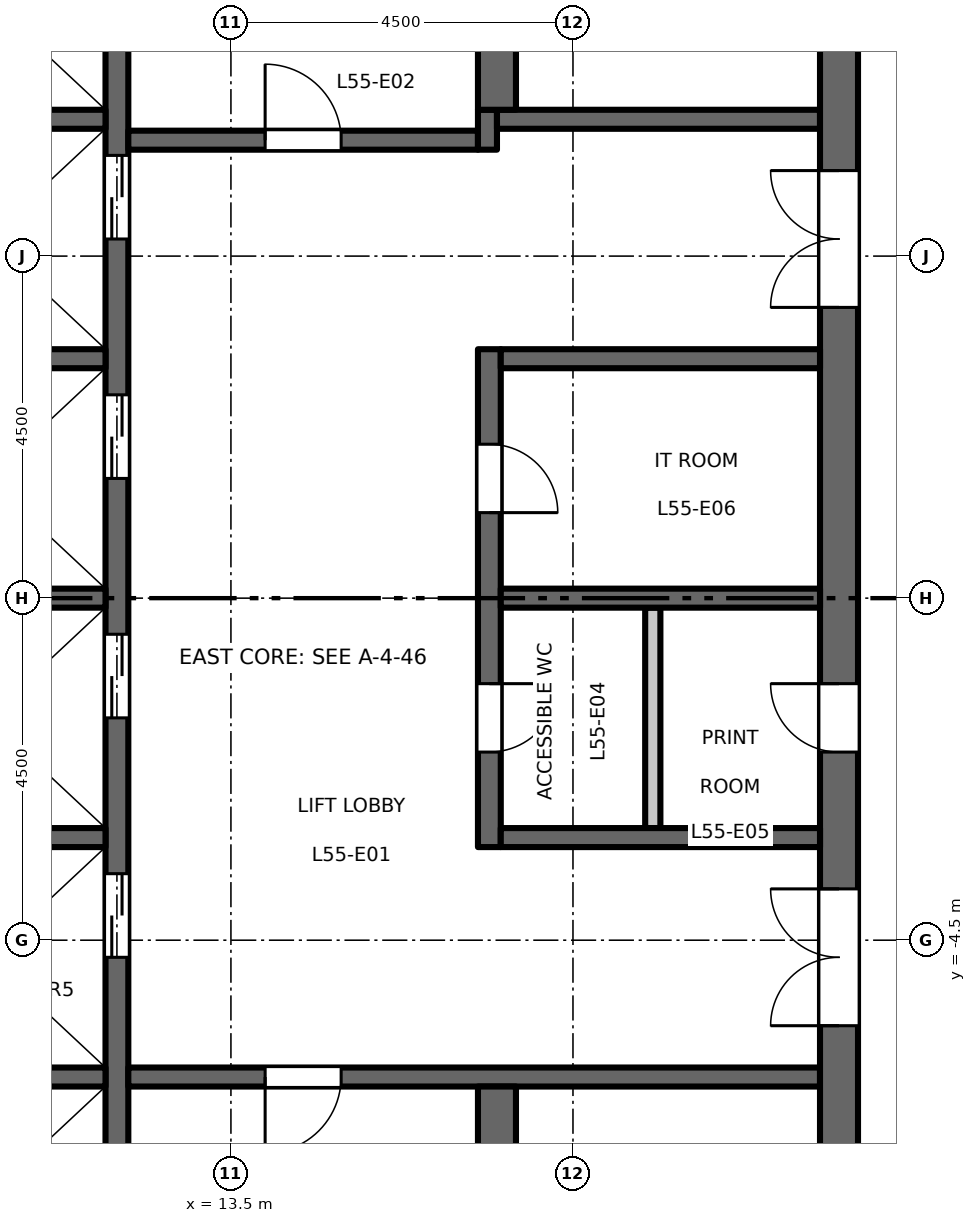
"""IFC4 building model, lengths in metres.
Left out: names, types, materials, properties, quantities, classifications, styles, units other than length and angle.
Written with IfcOpenShell. Run it as: python <this file> out.ifc"""

import sys

from ifc_helpers import new_model, si_unit, direction, frame, frame_2d, origin, place, context, subcontext, project, spatial, rectangle, extrude, element, fill, save


model = new_model("IFC4")
c1 = context("Model", 3, precision=1e-05, world=origin(), true_north=direction((0.0, 1.0)))
c2 = subcontext(c1, "Body", "Model", "MODEL_VIEW")
j1 = project(units=[si_unit("LENGTHUNIT", "METRE"), si_unit("PLANEANGLEUNIT", "RADIAN")], contexts=[c1])
p1 = place(None, origin())
s1 = spatial("IfcSite", under=j1, at=p1, CompositionType="ELEMENT")
p2 = place(p1, origin())
s2 = spatial("IfcBuilding", under=s1, at=p2, CompositionType="ELEMENT")
p3 = place(p2, frame((0.0, 0.0, 255.7)))
s3 = spatial("IfcBuildingStorey", under=s2, at=p3, CompositionType="ELEMENT", Elevation=255.7)
p4 = place(p3, frame((12.0, -9.45, 0.0), z_axis=(0.0, 0.0, 1.0), x_axis=(0.0, 1.0, 0.0)))
e1 = element("IfcWall", 1, at=p4, inside=s3, PredefinedType="SHEAR", context=c2, shape_type="SweptSolid", body=[
    extrude(rectangle(XDim=18.9, YDim=0.3, at=frame_2d((9.45, 0.0))), origin(), (0.0, 0.0, 1.0), 4.35),
])
p5 = place(p4, frame((4.725, 0.0, 0.0)))
e2 = element("IfcOpeningElement", 2, at=p5, cuts=e1, PredefinedType="OPENING", context=c2, shape_type="SweptSolid", body=[
    extrude(rectangle(XDim=1.1, YDim=2.1, at=frame_2d((0.55, 1.05))), frame((0.0, 0.16, 0.0), z_axis=(0.0, -1.0, 0.0), x_axis=(1.0, 0.0, 0.0)), (0.0, 0.0, 1.0), 0.32),
])
p6 = place(p4, frame((7.875, 0.0, 0.0)))
e3 = element("IfcOpeningElement", 3, at=p6, cuts=e1, PredefinedType="OPENING", context=c2, shape_type="SweptSolid", body=[
    extrude(rectangle(XDim=1.1, YDim=2.1, at=frame_2d((0.55, 1.05))), frame((0.0, 0.16, 0.0), z_axis=(0.0, -1.0, 0.0), x_axis=(1.0, 0.0, 0.0)), (0.0, 0.0, 1.0), 0.32),
])
p7 = place(p4, frame((11.025, 0.0, 0.0)))
e4 = element("IfcOpeningElement", 4, at=p7, cuts=e1, PredefinedType="OPENING", context=c2, shape_type="SweptSolid", body=[
    extrude(rectangle(XDim=1.1, YDim=2.1, at=frame_2d((0.55, 1.05))), frame((0.0, 0.16, 0.0), z_axis=(0.0, -1.0, 0.0), x_axis=(1.0, 0.0, 0.0)), (0.0, 0.0, 1.0), 0.32),
])
p8 = place(p4, frame((14.175, 0.0, 0.0)))
e5 = element("IfcOpeningElement", 5, at=p8, cuts=e1, PredefinedType="OPENING", context=c2, shape_type="SweptSolid", body=[
    extrude(rectangle(XDim=1.1, YDim=2.1, at=frame_2d((0.55, 1.05))), frame((0.0, 0.16, 0.0), z_axis=(0.0, -1.0, 0.0), x_axis=(1.0, 0.0, 0.0)), (0.0, 0.0, 1.0), 0.32),
])
p9 = place(p4, frame((16.725, 0.0, 0.0)))
e6 = element("IfcOpeningElement", 6, at=p9, cuts=e1, PredefinedType="OPENING", context=c2, shape_type="SweptSolid", body=[
    extrude(rectangle(XDim=1.2, YDim=2.1, at=frame_2d((0.6, 1.05))), frame((0.0, 0.16, 0.0), z_axis=(0.0, -1.0, 0.0), x_axis=(1.0, 0.0, 0.0)), (0.0, 0.0, 1.0), 0.32),
])
p10 = place(p4, frame((0.975, 0.0, 0.0)))
e7 = element("IfcOpeningElement", 7, at=p10, cuts=e1, PredefinedType="OPENING", context=c2, shape_type="SweptSolid", body=[
    extrude(rectangle(XDim=1.2, YDim=2.1, at=frame_2d((0.6, 1.05))), frame((0.0, 0.16, 0.0), z_axis=(0.0, -1.0, 0.0), x_axis=(1.0, 0.0, 0.0)), (0.0, 0.0, 1.0), 0.32),
])
p11 = place(p3, frame((12.15, 6.025, 0.0), z_axis=(0.0, 0.0, 1.0), x_axis=(1.0, 0.0, 0.0)))
e8 = element("IfcWall", 8, at=p11, inside=s3, PredefinedType="SHEAR", context=c2, shape_type="SweptSolid", body=[
    extrude(rectangle(XDim=4.6, YDim=0.25, at=frame_2d((2.3, 0.0))), origin(), (0.0, 0.0, 1.0), 4.35),
])
p12 = place(p11, frame((1.8, 0.0, 0.0)))
e9 = element("IfcOpeningElement", 9, at=p12, cuts=e8, PredefinedType="OPENING", context=c2, shape_type="SweptSolid", body=[
    extrude(rectangle(XDim=1.0, YDim=2.1, at=frame_2d((0.5, 1.05))), frame((0.0, 0.135, 0.0), z_axis=(0.0, -1.0, 0.0), x_axis=(1.0, 0.0, 0.0)), (0.0, 0.0, 1.0), 0.27),
])
p13 = place(p3, frame((16.875, 5.9, 0.0), z_axis=(0.0, 0.0, 1.0), x_axis=(0.0, 1.0, 0.0)))
e10 = element("IfcWall", 10, at=p13, inside=s3, PredefinedType="SHEAR", context=c2, shape_type="SweptSolid", body=[
    extrude(rectangle(XDim=0.525, YDim=0.25, at=frame_2d((0.263, 0.0))), origin(), (0.0, 0.0, 1.0), 4.35),
])
p14 = place(p3, frame((17.0, 6.3, 0.0), z_axis=(0.0, 0.0, 1.0), x_axis=(1.0, 0.0, 0.0)))
e11 = element("IfcWall", 11, at=p14, inside=s3, PredefinedType="SHEAR", context=c2, shape_type="SweptSolid", body=[
    extrude(rectangle(XDim=4.25, YDim=0.25, at=frame_2d((2.125, 0.0))), origin(), (0.0, 0.0, 1.0), 4.35),
])
p15 = place(p3, frame((12.15, -6.3, 0.0), z_axis=(0.0, 0.0, 1.0), x_axis=(1.0, 0.0, 0.0)))
e12 = element("IfcWall", 12, at=p15, inside=s3, PredefinedType="SHEAR", context=c2, shape_type="SweptSolid", body=[
    extrude(rectangle(XDim=9.1, YDim=0.25, at=frame_2d((4.55, 0.0))), origin(), (0.0, 0.0, 1.0), 4.35),
])
p16 = place(p15, frame((1.8, 0.0, 0.0)))
e13 = element("IfcOpeningElement", 13, at=p16, cuts=e12, PredefinedType="OPENING", context=c2, shape_type="SweptSolid", body=[
    extrude(rectangle(XDim=1.0, YDim=2.1, at=frame_2d((0.5, 1.05))), frame((0.0, 0.135, 0.0), z_axis=(0.0, -1.0, 0.0), x_axis=(1.0, 0.0, 0.0)), (0.0, 0.0, 1.0), 0.27),
])
p17 = place(p3, frame((21.5, -13.0, 0.0), z_axis=(0.0, 0.0, 1.0), x_axis=(0.0, 1.0, 0.0)))
e14 = element("IfcWall", 14, at=p17, inside=s3, PredefinedType="SHEAR", context=c2, shape_type="SweptSolid", body=[
    extrude(rectangle(XDim=26.0, YDim=0.5, at=frame_2d((13.0, 0.0))), origin(), (0.0, 0.0, 1.0), 4.35),
])
p18 = place(p17, frame((16.825, 0.0, 0.0)))
e15 = element("IfcOpeningElement", 15, at=p18, cuts=e14, PredefinedType="OPENING", context=c2, shape_type="SweptSolid", body=[
    extrude(rectangle(XDim=1.8, YDim=2.1, at=frame_2d((0.9, 1.05))), frame((0.0, 0.26, 0.0), z_axis=(0.0, -1.0, 0.0), x_axis=(1.0, 0.0, 0.0)), (0.0, 0.0, 1.0), 0.52),
])
p19 = place(p17, frame((7.375, 0.0, 0.0)))
e16 = element("IfcOpeningElement", 16, at=p19, cuts=e14, PredefinedType="OPENING", context=c2, shape_type="SweptSolid", body=[
    extrude(rectangle(XDim=1.8, YDim=2.1, at=frame_2d((0.9, 1.05))), frame((0.0, 0.26, 0.0), z_axis=(0.0, -1.0, 0.0), x_axis=(1.0, 0.0, 0.0)), (0.0, 0.0, 1.0), 0.52),
])
p20 = place(p17, frame((10.975, 0.0, 0.0)))
e17 = element("IfcOpeningElement", 17, at=p20, cuts=e14, PredefinedType="OPENING", context=c2, shape_type="SweptSolid", body=[
    extrude(rectangle(XDim=0.9, YDim=2.1, at=frame_2d((0.45, 1.05))), frame((0.0, 0.26, 0.0), z_axis=(0.0, -1.0, 0.0), x_axis=(1.0, 0.0, 0.0)), (0.0, 0.0, 1.0), 0.52),
])
p21 = place(p3, frame((16.9, -3.275, 0.0), z_axis=(0.0, 0.0, 1.0), x_axis=(0.0, 1.0, 0.0)))
e18 = element("IfcWall", 18, at=p21, inside=s3, PredefinedType="SHEAR", context=c2, shape_type="SweptSolid", body=[
    extrude(rectangle(XDim=6.55, YDim=0.3, at=frame_2d((3.275, 0.0))), origin(), (0.0, 0.0, 1.0), 4.35),
])
p22 = place(p21, frame((1.25, 0.0, 0.0)))
e19 = element("IfcOpeningElement", 19, at=p22, cuts=e18, PredefinedType="OPENING", context=c2, shape_type="SweptSolid", body=[
    extrude(rectangle(XDim=0.9, YDim=2.1, at=frame_2d((0.45, 1.05))), frame((0.0, 0.16, 0.0), z_axis=(0.0, -1.0, 0.0), x_axis=(1.0, 0.0, 0.0)), (0.0, 0.0, 1.0), 0.32),
])
p23 = place(p21, frame((4.4, 0.0, 0.0)))
e20 = element("IfcOpeningElement", 20, at=p23, cuts=e18, PredefinedType="OPENING", context=c2, shape_type="SweptSolid", body=[
    extrude(rectangle(XDim=0.9, YDim=2.1, at=frame_2d((0.45, 1.05))), frame((0.0, 0.16, 0.0), z_axis=(0.0, -1.0, 0.0), x_axis=(1.0, 0.0, 0.0)), (0.0, 0.0, 1.0), 0.32),
])
for number, where, z_axis, x_axis in (
    (21, (17.05, 0.0, 0.0), (0.0, 0.0, 1.0), (1.0, 0.0, 0.0)),
    (22, (17.05, 3.15, 0.0), (0.0, 0.0, 1.0), (1.0, 0.0, 0.0)),
    (23, (17.05, -3.15, 0.0), (0.0, 0.0, 1.0), (1.0, 0.0, 0.0)),
):
    element("IfcWall", number, at=place(p3, frame(where, z_axis=z_axis, x_axis=x_axis)), inside=s3, PredefinedType="SHEAR", context=c2, shape_type="SweptSolid", body=[
        extrude(rectangle(XDim=4.2, YDim=0.25, at=frame_2d((2.1, 0.0))), origin(), (0.0, 0.0, 1.0), 4.35),
    ])
p24 = place(p3, frame((19.05, -3.025, 0.0), z_axis=(0.0, 0.0, 1.0), x_axis=(0.0, 1.0, 0.0)))
e24 = element("IfcWall", 24, at=p24, inside=s3, PredefinedType="PARTITIONING", context=c2, shape_type="SweptSolid", body=[
    extrude(rectangle(XDim=2.9, YDim=0.2, at=frame_2d((1.45, 0.0))), origin(), (0.0, 0.0, 1.0), 4.35),
])
for number, where, z_axis, x_axis in (
    (25, (17.0, 6.425, 0.0), (0.0, 0.0, 1.0), (0.0, 1.0, 0.0)),
    (26, (17.0, -13.0, 0.0), (0.0, 0.0, 1.0), (0.0, 1.0, 0.0)),
):
    element("IfcWall", number, at=place(p3, frame(where, z_axis=z_axis, x_axis=x_axis)), inside=s3, PredefinedType="SHEAR", context=c2, shape_type="SweptSolid", body=[
        extrude(rectangle(XDim=6.575, YDim=0.5, at=frame_2d((3.288, 0.0))), origin(), (0.0, 0.0, 1.0), 4.35),
    ])
for number, where, z_axis, x_axis in (
    (27, (8.75, 0.0, 0.0), (0.0, 0.0, 1.0), (1.0, 0.0, 0.0)),
    (28, (8.75, 3.15, 0.0), (0.0, 0.0, 1.0), (1.0, 0.0, 0.0)),
    (29, (8.75, 6.3, 0.0), (0.0, 0.0, 1.0), (1.0, 0.0, 0.0)),
    (30, (8.75, -3.15, 0.0), (0.0, 0.0, 1.0), (1.0, 0.0, 0.0)),
    (31, (8.75, -6.3, 0.0), (0.0, 0.0, 1.0), (1.0, 0.0, 0.0)),
):
    element("IfcWall", number, at=place(p3, frame(where, z_axis=z_axis, x_axis=x_axis)), inside=s3, PredefinedType="SHEAR", context=c2, shape_type="SweptSolid", body=[
        extrude(rectangle(XDim=3.1, YDim=0.25, at=frame_2d((1.55, 0.0))), origin(), (0.0, 0.0, 1.0), 4.35),
    ])
p25 = place(p12, origin())
e32 = element("IfcDoor", 32, at=p25, inside=s3, OperationType="SINGLE_SWING_RIGHT", PredefinedType="DOOR", context=c2, shape_type="SweptSolid", body=[
    extrude(rectangle(XDim=1.0, YDim=2.1, at=frame_2d((0.5, 1.05))), frame((0.0, 0.025, 0.0), z_axis=(0.0, -1.0, 0.0), x_axis=(1.0, 0.0, 0.0)), (0.0, 0.0, 1.0), 0.05),
])
fill(e9, e32)
p26 = place(p16, origin())
e33 = element("IfcDoor", 33, at=p26, inside=s3, OperationType="SINGLE_SWING_LEFT", PredefinedType="DOOR", context=c2, shape_type="SweptSolid", body=[
    extrude(rectangle(XDim=1.0, YDim=2.1, at=frame_2d((0.5, 1.05))), frame((0.0, 0.025, 0.0), z_axis=(0.0, -1.0, 0.0), x_axis=(1.0, 0.0, 0.0)), (0.0, 0.0, 1.0), 0.05),
])
fill(e13, e33)
p27 = place(p18, origin())
e34 = element("IfcDoor", 34, at=p27, inside=s3, OperationType="DOUBLE_DOOR_DOUBLE_SWING", PredefinedType="DOOR", context=c2, shape_type="SweptSolid", body=[
    extrude(rectangle(XDim=1.8, YDim=2.1, at=frame_2d((0.9, 1.05))), frame((0.0, 0.025, 0.0), z_axis=(0.0, -1.0, 0.0), x_axis=(1.0, 0.0, 0.0)), (0.0, 0.0, 1.0), 0.05),
])
fill(e15, e34)
p28 = place(p19, origin())
e35 = element("IfcDoor", 35, at=p28, inside=s3, OperationType="DOUBLE_DOOR_DOUBLE_SWING", PredefinedType="DOOR", context=c2, shape_type="SweptSolid", body=[
    extrude(rectangle(XDim=1.8, YDim=2.1, at=frame_2d((0.9, 1.05))), frame((0.0, 0.025, 0.0), z_axis=(0.0, -1.0, 0.0), x_axis=(1.0, 0.0, 0.0)), (0.0, 0.0, 1.0), 0.05),
])
fill(e16, e35)
p29 = place(p5, origin())
e36 = element("IfcDoor", 36, at=p29, inside=s3, OperationType="DOUBLE_DOOR_SLIDING", PredefinedType="DOOR", context=c2, shape_type="SweptSolid", body=[
    extrude(rectangle(XDim=1.1, YDim=2.1, at=frame_2d((0.55, 1.05))), frame((0.0, 0.025, 0.0), z_axis=(0.0, -1.0, 0.0), x_axis=(1.0, 0.0, 0.0)), (0.0, 0.0, 1.0), 0.05),
])
fill(e2, e36)
p30 = place(p6, origin())
e37 = element("IfcDoor", 37, at=p30, inside=s3, OperationType="DOUBLE_DOOR_SLIDING", PredefinedType="DOOR", context=c2, shape_type="SweptSolid", body=[
    extrude(rectangle(XDim=1.1, YDim=2.1, at=frame_2d((0.55, 1.05))), frame((0.0, 0.025, 0.0), z_axis=(0.0, -1.0, 0.0), x_axis=(1.0, 0.0, 0.0)), (0.0, 0.0, 1.0), 0.05),
])
fill(e3, e37)
p31 = place(p7, origin())
e38 = element("IfcDoor", 38, at=p31, inside=s3, OperationType="DOUBLE_DOOR_SLIDING", PredefinedType="DOOR", context=c2, shape_type="SweptSolid", body=[
    extrude(rectangle(XDim=1.1, YDim=2.1, at=frame_2d((0.55, 1.05))), frame((0.0, 0.025, 0.0), z_axis=(0.0, -1.0, 0.0), x_axis=(1.0, 0.0, 0.0)), (0.0, 0.0, 1.0), 0.05),
])
fill(e4, e38)
p32 = place(p8, origin())
e39 = element("IfcDoor", 39, at=p32, inside=s3, OperationType="DOUBLE_DOOR_SLIDING", PredefinedType="DOOR", context=c2, shape_type="SweptSolid", body=[
    extrude(rectangle(XDim=1.1, YDim=2.1, at=frame_2d((0.55, 1.05))), frame((0.0, 0.025, 0.0), z_axis=(0.0, -1.0, 0.0), x_axis=(1.0, 0.0, 0.0)), (0.0, 0.0, 1.0), 0.05),
])
fill(e5, e39)
p33 = place(p22, origin())
e40 = element("IfcDoor", 40, at=p33, inside=s3, OperationType="SINGLE_SWING_RIGHT", PredefinedType="DOOR", context=c2, shape_type="SweptSolid", body=[
    extrude(rectangle(XDim=0.9, YDim=2.1, at=frame_2d((0.45, 1.05))), frame((0.0, 0.025, 0.0), z_axis=(0.0, -1.0, 0.0), x_axis=(1.0, 0.0, 0.0)), (0.0, 0.0, 1.0), 0.05),
])
fill(e19, e40)
p34 = place(p20, origin())
e41 = element("IfcDoor", 41, at=p34, inside=s3, OperationType="SINGLE_SWING_LEFT", PredefinedType="DOOR", context=c2, shape_type="SweptSolid", body=[
    extrude(rectangle(XDim=0.9, YDim=2.1, at=frame_2d((0.45, 1.05))), frame((0.0, 0.025, 0.0), z_axis=(0.0, -1.0, 0.0), x_axis=(1.0, 0.0, 0.0)), (0.0, 0.0, 1.0), 0.05),
])
fill(e17, e41)
p35 = place(p23, origin())
e42 = element("IfcDoor", 42, at=p35, inside=s3, OperationType="SINGLE_SWING_LEFT", PredefinedType="DOOR", context=c2, shape_type="SweptSolid", body=[
    extrude(rectangle(XDim=0.9, YDim=2.1, at=frame_2d((0.45, 1.05))), frame((0.0, 0.025, 0.0), z_axis=(0.0, -1.0, 0.0), x_axis=(1.0, 0.0, 0.0)), (0.0, 0.0, 1.0), 0.05),
])
fill(e20, e42)
save(model, sys.argv[1])
